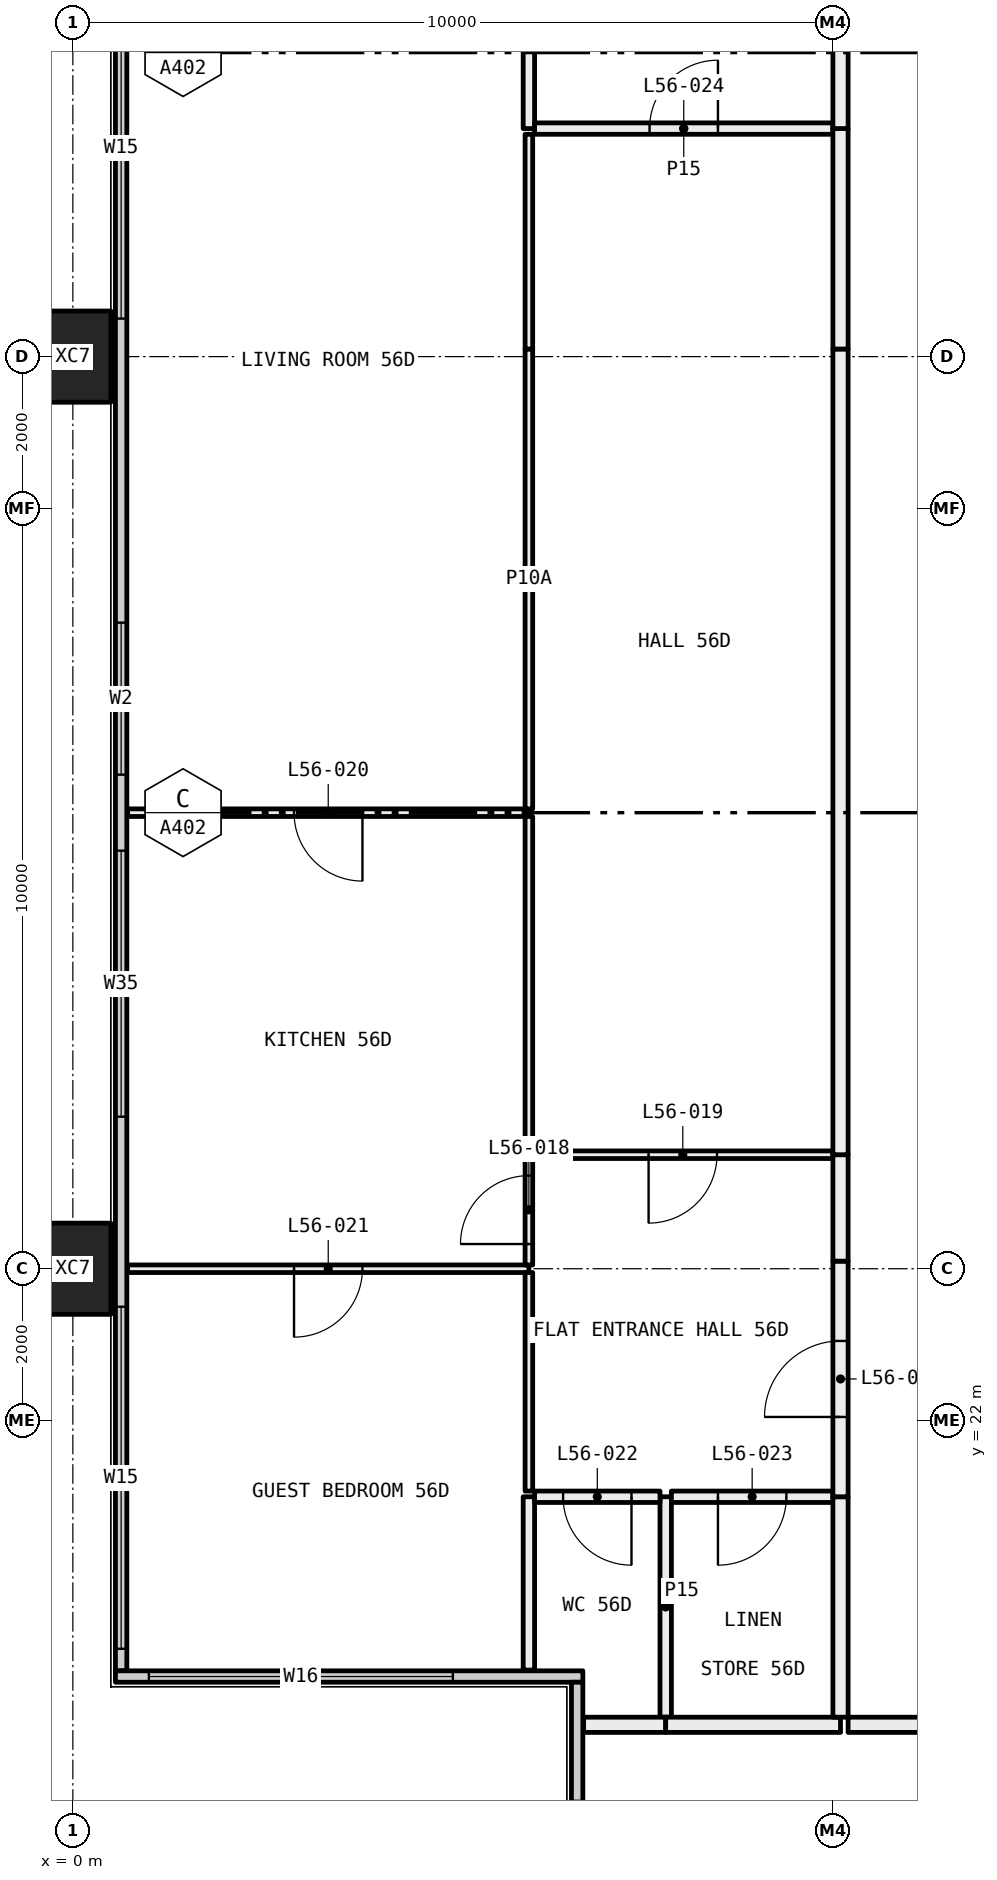
"""IFC4 building model, lengths in metres.
Left out: names, types, materials, properties, quantities, classifications, styles, units other than length and angle.
Written with IfcOpenShell. Run it as: python <this file> out.ifc"""

import sys

from ifc_helpers import new_model, si_unit, direction, frame, frame_2d, origin, origin_2d, place, context, subcontext, project, spatial, rectangle, hollow_rectangle, extrude, element, fill, save


model = new_model("IFC4")
c1 = context("Model", 3, precision=1e-05, world=origin(), true_north=direction((0.0, 1.0)))
c2 = subcontext(c1, "Body", "Model", "MODEL_VIEW")
j1 = project(units=[si_unit("LENGTHUNIT", "METRE"), si_unit("PLANEANGLEUNIT", "RADIAN")], contexts=[c1])
p1 = place(None, origin())
s1 = spatial("IfcSite", under=j1, at=p1, CompositionType="ELEMENT")
p2 = place(p1, origin())
s2 = spatial("IfcBuilding", under=s1, at=p2, CompositionType="ELEMENT")
p3 = place(p2, frame((0.0, 0.0, 210.0)))
s3 = spatial("IfcBuildingStorey", under=s2, at=p3, CompositionType="ELEMENT", Elevation=210.0)
for number, where, z_axis, x_axis in (
    (1, (0.0, 24.0, -0.4), (0.0, 0.0, 1.0), (0.0, 1.0, 0.0)),
    (2, (0.0, 36.0, -0.4), (0.0, 0.0, 1.0), (0.0, 1.0, 0.0)),
):
    element("IfcColumn", number, at=place(p3, frame(where, z_axis=z_axis, x_axis=x_axis)), inside=s3, PredefinedType="COLUMN", context=c2, shape_type="SweptSolid", body=[
        extrude(hollow_rectangle(XDim=1.2, YDim=1.0, WallThickness=0.045, at=origin_2d()), origin(), (0.0, 0.0, 1.0), 3.45),
    ])
p4 = place(p3, frame((0.635, 18.71, 0.0), z_axis=(0.0, 0.0, 1.0), x_axis=(0.0, 1.0, 0.0)))
e3 = element("IfcWall", 3, at=p4, inside=s3, PredefinedType="ELEMENTEDWALL", context=c2, shape_type="SweptSolid", body=[
    extrude(rectangle(XDim=22.58, YDim=0.15, at=frame_2d((11.29, 0.0))), origin(), (0.0, 0.0, 1.0), 3.05),
])
p5 = place(p4, frame((0.29, 0.0, 0.45)))
e4 = element("IfcOpeningElement", 4, at=p5, cuts=e3, PredefinedType="OPENING", context=c2, shape_type="SweptSolid", body=[
    extrude(rectangle(XDim=4.5, YDim=2.55, at=frame_2d((2.25, 1.275))), frame((0.0, 0.085, 0.0), z_axis=(0.0, -1.0, 0.0), x_axis=(1.0, 0.0, 0.0)), (0.0, 0.0, 1.0), 0.17),
])
p6 = place(p4, frame((7.29, 0.0, 0.45)))
e5 = element("IfcOpeningElement", 5, at=p6, cuts=e3, PredefinedType="OPENING", context=c2, shape_type="SweptSolid", body=[
    extrude(rectangle(XDim=3.5, YDim=2.55, at=frame_2d((1.75, 1.275))), frame((0.0, 0.085, 0.0), z_axis=(0.0, -1.0, 0.0), x_axis=(1.0, 0.0, 0.0)), (0.0, 0.0, 1.0), 0.17),
])
p7 = place(p4, frame((11.79, 0.0, 0.45)))
e6 = element("IfcOpeningElement", 6, at=p7, cuts=e3, PredefinedType="OPENING", context=c2, shape_type="SweptSolid", body=[
    extrude(rectangle(XDim=2.0, YDim=2.55, at=frame_2d((1.0, 1.275))), frame((0.0, 0.085, 0.0), z_axis=(0.0, -1.0, 0.0), x_axis=(1.0, 0.0, 0.0)), (0.0, 0.0, 1.0), 0.17),
])
p8 = place(p4, frame((17.79, 0.0, 0.45)))
e7 = element("IfcOpeningElement", 7, at=p8, cuts=e3, PredefinedType="OPENING", context=c2, shape_type="SweptSolid", body=[
    extrude(rectangle(XDim=4.5, YDim=2.55, at=frame_2d((2.25, 1.275))), frame((0.0, 0.085, 0.0), z_axis=(0.0, -1.0, 0.0), x_axis=(1.0, 0.0, 0.0)), (0.0, 0.0, 1.0), 0.17),
])
p9 = place(p3, frame((0.56, 18.635, 0.0), z_axis=(0.0, 0.0, 1.0), x_axis=(1.0, 0.0, 0.0)))
e8 = element("IfcWall", 8, at=p9, inside=s3, PredefinedType="ELEMENTEDWALL", context=c2, shape_type="SweptSolid", body=[
    extrude(rectangle(XDim=6.15, YDim=0.15, at=frame_2d((3.075, 0.0))), origin(), (0.0, 0.0, 1.0), 3.05),
])
p10 = place(p9, frame((0.44, 0.0, 0.45)))
e9 = element("IfcOpeningElement", 9, at=p10, cuts=e8, PredefinedType="OPENING", context=c2, shape_type="SweptSolid", body=[
    extrude(rectangle(XDim=4.0, YDim=2.55, at=frame_2d((2.0, 1.275))), frame((0.0, 0.085, 0.0), z_axis=(0.0, -1.0, 0.0), x_axis=(1.0, 0.0, 0.0)), (0.0, 0.0, 1.0), 0.17),
])
p11 = place(p3, frame((6.635, 12.71, 0.0), z_axis=(0.0, 0.0, 1.0), x_axis=(0.0, 1.0, 0.0)))
e10 = element("IfcWall", 10, at=p11, inside=s3, PredefinedType="ELEMENTEDWALL", context=c2, shape_type="SweptSolid", body=[
    extrude(rectangle(XDim=5.85, YDim=0.15, at=frame_2d((2.925, 0.0))), origin(), (0.0, 0.0, 1.0), 3.05),
])
p12 = place(p11, frame((0.29, 0.0, 0.45)))
e11 = element("IfcOpeningElement", 11, at=p12, cuts=e10, PredefinedType="OPENING", context=c2, shape_type="SweptSolid", body=[
    extrude(rectangle(XDim=4.0, YDim=2.55, at=frame_2d((2.0, 1.275))), frame((0.0, 0.085, 0.0), z_axis=(0.0, -1.0, 0.0), x_axis=(1.0, 0.0, 0.0)), (0.0, 0.0, 1.0), 0.17),
])
p13 = place(p3, frame((6.0, 24.0, 0.0), z_axis=(0.0, 0.0, 1.0), x_axis=(-1.0, 0.0, 0.0)))
e12 = element("IfcWall", 12, at=p13, inside=s3, PredefinedType="PARTITIONING", context=c2, shape_type="SweptSolid", body=[
    extrude(rectangle(XDim=5.28, YDim=0.1, at=frame_2d((2.64, 0.0))), origin(), (0.0, 0.0, 1.0), 2.45),
])
p14 = place(p13, frame((2.19, 0.0, 0.0)))
e13 = element("IfcOpeningElement", 13, at=p14, cuts=e12, PredefinedType="OPENING", context=c2, shape_type="SweptSolid", body=[
    extrude(rectangle(XDim=0.9, YDim=2.1, at=frame_2d((0.45, 1.05))), frame((0.0, 0.06, 0.0), z_axis=(0.0, -1.0, 0.0), x_axis=(1.0, 0.0, 0.0)), (0.0, 0.0, 1.0), 0.12),
])
p15 = place(p3, frame((6.0, 18.72, 0.0), z_axis=(0.0, 0.0, 1.0), x_axis=(0.0, 1.0, 0.0)))
e14 = element("IfcWall", 14, at=p15, inside=s3, PredefinedType="PARTITIONING", context=c2, shape_type="SweptSolid", body=[
    extrude(rectangle(XDim=2.28, YDim=0.15, at=frame_2d((1.14, 0.0))), origin(), (0.0, 0.0, 1.0), 3.05),
])
p16 = place(p3, frame((6.0, 21.075, 0.0), z_axis=(0.0, 0.0, 1.0), x_axis=(0.0, 1.0, 0.0)))
e15 = element("IfcWall", 15, at=p16, inside=s3, PredefinedType="PARTITIONING", context=c2, shape_type="SweptSolid", body=[
    extrude(rectangle(XDim=2.875, YDim=0.1, at=frame_2d((1.438, 0.0))), origin(), (0.0, 0.0, 1.0), 2.45),
])
p17 = place(p3, frame((6.0, 30.0, 0.0), z_axis=(0.0, 0.0, 1.0), x_axis=(-1.0, 0.0, 0.0)))
e16 = element("IfcWall", 16, at=p17, inside=s3, PredefinedType="PARTITIONING", context=c2, shape_type="SweptSolid", body=[
    extrude(rectangle(XDim=5.28, YDim=0.1, at=frame_2d((2.64, 0.0))), origin(), (0.0, 0.0, 1.0), 3.05),
])
p18 = place(p17, frame((2.19, 0.0, 0.0)))
e17 = element("IfcOpeningElement", 17, at=p18, cuts=e16, PredefinedType="OPENING", context=c2, shape_type="SweptSolid", body=[
    extrude(rectangle(XDim=0.9, YDim=2.1, at=frame_2d((0.45, 1.05))), frame((0.0, 0.06, 0.0), z_axis=(0.0, -1.0, 0.0), x_axis=(1.0, 0.0, 0.0)), (0.0, 0.0, 1.0), 0.12),
])
p19 = place(p3, frame((6.0, 24.05, 0.0), z_axis=(0.0, 0.0, 1.0), x_axis=(0.0, 1.0, 0.0)))
e18 = element("IfcWall", 18, at=p19, inside=s3, PredefinedType="PARTITIONING", context=c2, shape_type="SweptSolid", body=[
    extrude(rectangle(XDim=1.45, YDim=0.1, at=frame_2d((0.725, 0.0))), origin(), (0.0, 0.0, 1.0), 2.45),
])
p20 = place(p19, frame((0.275, 0.0, 0.0)))
e19 = element("IfcOpeningElement", 19, at=p20, cuts=e18, PredefinedType="OPENING", context=c2, shape_type="SweptSolid", body=[
    extrude(rectangle(XDim=0.9, YDim=2.1, at=frame_2d((0.45, 1.05))), frame((0.0, 0.06, 0.0), z_axis=(0.0, -1.0, 0.0), x_axis=(1.0, 0.0, 0.0)), (0.0, 0.0, 1.0), 0.12),
])
p21 = place(p3, frame((6.0, 25.5, 0.0), z_axis=(0.0, 0.0, 1.0), x_axis=(0.0, 1.0, 0.0)))
e20 = element("IfcWall", 20, at=p21, inside=s3, PredefinedType="PARTITIONING", context=c2, shape_type="SweptSolid", body=[
    extrude(rectangle(XDim=4.45, YDim=0.1, at=frame_2d((2.225, 0.0))), origin(), (0.0, 0.0, 1.0), 3.05),
])
p22 = place(p3, frame((6.0, 30.05, 0.0), z_axis=(0.0, 0.0, 1.0), x_axis=(0.0, 1.0, 0.0)))
e21 = element("IfcWall", 21, at=p22, inside=s3, PredefinedType="PARTITIONING", context=c2, shape_type="SweptSolid", body=[
    extrude(rectangle(XDim=6.05, YDim=0.1, at=frame_2d((3.025, 0.0))), origin(), (0.0, 0.0, 1.0), 2.45),
])
p23 = place(p3, frame((6.0, 36.1, 0.0), z_axis=(0.0, 0.0, 1.0), x_axis=(0.0, 1.0, 0.0)))
e22 = element("IfcWall", 22, at=p23, inside=s3, PredefinedType="PARTITIONING", context=c2, shape_type="SweptSolid", body=[
    extrude(rectangle(XDim=2.825, YDim=0.1, at=frame_2d((1.413, 0.0))), origin(), (0.0, 0.0, 1.0), 3.05),
])
p24 = place(p3, frame((6.0, 39.0, 0.0), z_axis=(0.0, 0.0, 1.0), x_axis=(0.0, 1.0, 0.0)))
e23 = element("IfcWall", 23, at=p24, inside=s3, PredefinedType="PARTITIONING", context=c2, shape_type="SweptSolid", body=[
    extrude(rectangle(XDim=2.28, YDim=0.15, at=frame_2d((1.14, 0.0))), origin(), (0.0, 0.0, 1.0), 3.05),
])
p25 = place(p3, frame((7.8, 18.1, 0.0), z_axis=(0.0, 0.0, 1.0), x_axis=(0.0, 1.0, 0.0)))
e24 = element("IfcWall", 24, at=p25, inside=s3, PredefinedType="PARTITIONING", context=c2, shape_type="SweptSolid", body=[
    extrude(rectangle(XDim=2.9, YDim=0.15, at=frame_2d((1.45, 0.0))), origin(), (0.0, 0.0, 1.0), 3.05),
])
p26 = place(p3, frame((7.725, 21.0, 0.0), z_axis=(0.0, 0.0, 1.0), x_axis=(-1.0, 0.0, 0.0)))
e25 = element("IfcWall", 25, at=p26, inside=s3, PredefinedType="PARTITIONING", context=c2, shape_type="SweptSolid", body=[
    extrude(rectangle(XDim=1.65, YDim=0.15, at=frame_2d((0.825, 0.0))), origin(), (0.0, 0.0, 1.0), 3.05),
])
p27 = place(p26, frame((0.375, 0.0, 0.0)))
e26 = element("IfcOpeningElement", 26, at=p27, cuts=e25, PredefinedType="OPENING", context=c2, shape_type="SweptSolid", body=[
    extrude(rectangle(XDim=0.9, YDim=2.1, at=frame_2d((0.45, 1.05))), frame((0.0, 0.085, 0.0), z_axis=(0.0, -1.0, 0.0), x_axis=(1.0, 0.0, 0.0)), (0.0, 0.0, 1.0), 0.17),
])
p28 = place(p3, frame((6.72, 18.0, 0.0), z_axis=(0.0, 0.0, 1.0), x_axis=(1.0, 0.0, 0.0)))
e27 = element("IfcWall", 27, at=p28, inside=s3, PredefinedType="PARTITIONING", context=c2, shape_type="SweptSolid", body=[
    extrude(rectangle(XDim=1.08, YDim=0.2, at=frame_2d((0.54, 0.0))), origin(), (0.0, 0.0, 1.0), 3.05),
])
p29 = place(p3, frame((10.0, 21.0, 0.0), z_axis=(0.0, 0.0, 1.0), x_axis=(-1.0, 0.0, 0.0)))
e28 = element("IfcWall", 28, at=p29, inside=s3, PredefinedType="PARTITIONING", context=c2, shape_type="SweptSolid", body=[
    extrude(rectangle(XDim=2.125, YDim=0.15, at=frame_2d((1.062, 0.0))), origin(), (0.0, 0.0, 1.0), 3.05),
])
p30 = place(p29, frame((0.613, 0.0, 0.0)))
e29 = element("IfcOpeningElement", 29, at=p30, cuts=e28, PredefinedType="OPENING", context=c2, shape_type="SweptSolid", body=[
    extrude(rectangle(XDim=0.9, YDim=2.1, at=frame_2d((0.45, 1.05))), frame((0.0, 0.085, 0.0), z_axis=(0.0, -1.0, 0.0), x_axis=(1.0, 0.0, 0.0)), (0.0, 0.0, 1.0), 0.17),
])
p31 = place(p3, frame((7.8, 18.0, 0.0), z_axis=(0.0, 0.0, 1.0), x_axis=(1.0, 0.0, 0.0)))
e30 = element("IfcWall", 30, at=p31, inside=s3, PredefinedType="PARTITIONING", context=c2, shape_type="SweptSolid", body=[
    extrude(rectangle(XDim=2.3, YDim=0.2, at=frame_2d((1.15, 0.0))), origin(), (0.0, 0.0, 1.0), 3.05),
])
p32 = place(p3, frame((10.1, 18.1, 0.0), z_axis=(0.0, 0.0, 1.0), x_axis=(0.0, 1.0, 0.0)))
e31 = element("IfcWall", 31, at=p32, inside=s3, PredefinedType="PARTITIONING", context=c2, shape_type="SweptSolid", body=[
    extrude(rectangle(XDim=2.9, YDim=0.2, at=frame_2d((1.45, 0.0))), origin(), (0.0, 0.0, 1.0), 3.05),
])
p33 = place(p3, frame((10.0, 25.5, 0.0), z_axis=(0.0, 0.0, 1.0), x_axis=(-1.0, 0.0, 0.0)))
e32 = element("IfcWall", 32, at=p33, inside=s3, PredefinedType="PARTITIONING", context=c2, shape_type="SweptSolid", body=[
    extrude(rectangle(XDim=3.95, YDim=0.1, at=frame_2d((1.975, 0.0))), origin(), (0.0, 0.0, 1.0), 3.05),
])
p34 = place(p33, frame((1.525, 0.0, 0.0)))
e33 = element("IfcOpeningElement", 33, at=p34, cuts=e32, PredefinedType="OPENING", context=c2, shape_type="SweptSolid", body=[
    extrude(rectangle(XDim=0.9, YDim=2.1, at=frame_2d((0.45, 1.05))), frame((0.0, 0.06, 0.0), z_axis=(0.0, -1.0, 0.0), x_axis=(1.0, 0.0, 0.0)), (0.0, 0.0, 1.0), 0.12),
])
p35 = place(p3, frame((10.1, 21.0, 0.0), z_axis=(0.0, 0.0, 1.0), x_axis=(0.0, 1.0, 0.0)))
e34 = element("IfcWall", 34, at=p35, inside=s3, PredefinedType="PARTITIONING", context=c2, shape_type="SweptSolid", body=[
    extrude(rectangle(XDim=3.1, YDim=0.2, at=frame_2d((1.55, 0.0))), origin(), (0.0, 0.0, 1.0), 2.45),
])
p36 = place(p35, frame((1.05, 0.0, 0.0)))
e35 = element("IfcOpeningElement", 35, at=p36, cuts=e34, PredefinedType="OPENING", context=c2, shape_type="SweptSolid", body=[
    extrude(rectangle(XDim=1.0, YDim=2.1, at=frame_2d((0.5, 1.05))), frame((0.0, 0.11, 0.0), z_axis=(0.0, -1.0, 0.0), x_axis=(1.0, 0.0, 0.0)), (0.0, 0.0, 1.0), 0.22),
])
p37 = place(p3, frame((10.1, 24.1, 0.0), z_axis=(0.0, 0.0, 1.0), x_axis=(0.0, 1.0, 0.0)))
e36 = element("IfcWall", 36, at=p37, inside=s3, PredefinedType="PARTITIONING", context=c2, shape_type="SweptSolid", body=[
    extrude(rectangle(XDim=1.4, YDim=0.2, at=frame_2d((0.7, 0.0))), origin(), (0.0, 0.0, 1.0), 3.05),
])
p38 = place(p3, frame((10.0, 39.0, 0.0), z_axis=(0.0, 0.0, 1.0), x_axis=(-1.0, 0.0, 0.0)))
e37 = element("IfcWall", 37, at=p38, inside=s3, PredefinedType="PARTITIONING", context=c2, shape_type="SweptSolid", body=[
    extrude(rectangle(XDim=3.925, YDim=0.15, at=frame_2d((1.962, 0.0))), origin(), (0.0, 0.0, 1.0), 3.05),
])
p39 = place(p38, frame((1.512, 0.0, 0.0)))
e38 = element("IfcOpeningElement", 38, at=p39, cuts=e37, PredefinedType="OPENING", context=c2, shape_type="SweptSolid", body=[
    extrude(rectangle(XDim=0.9, YDim=2.1, at=frame_2d((0.45, 1.05))), frame((0.0, 0.085, 0.0), z_axis=(0.0, -1.0, 0.0), x_axis=(1.0, 0.0, 0.0)), (0.0, 0.0, 1.0), 0.17),
])
p40 = place(p3, frame((10.1, 25.5, 0.0), z_axis=(0.0, 0.0, 1.0), x_axis=(0.0, 1.0, 0.0)))
e39 = element("IfcWall", 39, at=p40, inside=s3, PredefinedType="PARTITIONING", context=c2, shape_type="SweptSolid", body=[
    extrude(rectangle(XDim=10.6, YDim=0.2, at=frame_2d((5.3, 0.0))), origin(), (0.0, 0.0, 1.0), 2.45),
])
for number, where, z_axis, x_axis in (
    (40, (10.1, 36.1, 0.0), (0.0, 0.0, 1.0), (0.0, 1.0, 0.0)),
    (41, (10.1, 39.0, 0.0), (0.0, 0.0, 1.0), (0.0, 1.0, 0.0)),
):
    element("IfcWall", number, at=place(p3, frame(where, z_axis=z_axis, x_axis=x_axis)), inside=s3, PredefinedType="PARTITIONING", context=c2, shape_type="SweptSolid", body=[
        extrude(rectangle(XDim=2.9, YDim=0.2, at=frame_2d((1.45, 0.0))), origin(), (0.0, 0.0, 1.0), 3.05),
    ])
p41 = place(p3, frame((23.9, 18.0, 0.0), z_axis=(0.0, 0.0, 1.0), x_axis=(-1.0, 0.0, 0.0)))
e42 = element("IfcWall", 42, at=p41, inside=s3, PredefinedType="PARTITIONING", context=c2, shape_type="SweptSolid", body=[
    extrude(rectangle(XDim=13.7, YDim=0.2, at=frame_2d((6.85, 0.0))), origin(), (0.0, 0.0, 1.0), 3.05),
])
p42 = place(p41, frame((6.05, 0.0, 0.0)))
e43 = element("IfcOpeningElement", 43, at=p42, cuts=e42, PredefinedType="OPENING", context=c2, shape_type="SweptSolid", body=[
    extrude(rectangle(XDim=1.6, YDim=2.1, at=frame_2d((0.8, 1.05))), frame((0.0, 0.11, 0.0), z_axis=(0.0, -1.0, 0.0), x_axis=(1.0, 0.0, 0.0)), (0.0, 0.0, 1.0), 0.22),
])
p43 = place(p5, origin())
e44 = element("IfcWindow", 44, at=p43, inside=s3, PartitioningType="SINGLE_PANEL", PredefinedType="WINDOW", context=c2, shape_type="SweptSolid", body=[
    extrude(rectangle(XDim=4.5, YDim=2.55, at=frame_2d((2.25, 1.275))), frame((0.0, 0.03, 0.0), z_axis=(0.0, -1.0, 0.0), x_axis=(1.0, 0.0, 0.0)), (0.0, 0.0, 1.0), 0.06),
])
fill(e4, e44)
p44 = place(p6, origin())
e45 = element("IfcWindow", 45, at=p44, inside=s3, PartitioningType="SINGLE_PANEL", PredefinedType="WINDOW", context=c2, shape_type="SweptSolid", body=[
    extrude(rectangle(XDim=3.5, YDim=2.55, at=frame_2d((1.75, 1.275))), frame((0.0, 0.03, 0.0), z_axis=(0.0, -1.0, 0.0), x_axis=(1.0, 0.0, 0.0)), (0.0, 0.0, 1.0), 0.06),
])
fill(e5, e45)
p45 = place(p7, origin())
e46 = element("IfcWindow", 46, at=p45, inside=s3, PartitioningType="SINGLE_PANEL", PredefinedType="WINDOW", context=c2, shape_type="SweptSolid", body=[
    extrude(rectangle(XDim=2.0, YDim=2.55, at=frame_2d((1.0, 1.275))), frame((0.0, 0.03, 0.0), z_axis=(0.0, -1.0, 0.0), x_axis=(1.0, 0.0, 0.0)), (0.0, 0.0, 1.0), 0.06),
])
fill(e6, e46)
p46 = place(p8, origin())
e47 = element("IfcWindow", 47, at=p46, inside=s3, PartitioningType="SINGLE_PANEL", PredefinedType="WINDOW", context=c2, shape_type="SweptSolid", body=[
    extrude(rectangle(XDim=4.5, YDim=2.55, at=frame_2d((2.25, 1.275))), frame((0.0, 0.03, 0.0), z_axis=(0.0, -1.0, 0.0), x_axis=(1.0, 0.0, 0.0)), (0.0, 0.0, 1.0), 0.06),
])
fill(e7, e47)
p47 = place(p10, origin())
e48 = element("IfcWindow", 48, at=p47, inside=s3, PartitioningType="SINGLE_PANEL", PredefinedType="WINDOW", context=c2, shape_type="SweptSolid", body=[
    extrude(rectangle(XDim=4.0, YDim=2.55, at=frame_2d((2.0, 1.275))), frame((0.0, 0.03, 0.0), z_axis=(0.0, -1.0, 0.0), x_axis=(1.0, 0.0, 0.0)), (0.0, 0.0, 1.0), 0.06),
])
fill(e9, e48)
p48 = place(p36, origin())
e49 = element("IfcDoor", 49, at=p48, inside=s3, OperationType="SINGLE_SWING_RIGHT", PredefinedType="DOOR", context=c2, shape_type="SweptSolid", body=[
    extrude(rectangle(XDim=1.0, YDim=2.1, at=frame_2d((0.5, 1.05))), frame((0.0, 0.025, 0.0), z_axis=(0.0, -1.0, 0.0), x_axis=(1.0, 0.0, 0.0)), (0.0, 0.0, 1.0), 0.05),
])
fill(e35, e49)
p49 = place(p20, origin())
e50 = element("IfcDoor", 50, at=p49, inside=s3, OperationType="SINGLE_SWING_RIGHT", PredefinedType="DOOR", context=c2, shape_type="SweptSolid", body=[
    extrude(rectangle(XDim=0.9, YDim=2.1, at=frame_2d((0.45, 1.05))), frame((0.0, 0.025, 0.0), z_axis=(0.0, -1.0, 0.0), x_axis=(1.0, 0.0, 0.0)), (0.0, 0.0, 1.0), 0.05),
])
fill(e19, e50)
p50 = place(p34, origin())
e51 = element("IfcDoor", 51, at=p50, inside=s3, OperationType="SINGLE_SWING_LEFT", PredefinedType="DOOR", context=c2, shape_type="SweptSolid", body=[
    extrude(rectangle(XDim=0.9, YDim=2.1, at=frame_2d((0.45, 1.05))), frame((0.0, 0.025, 0.0), z_axis=(0.0, -1.0, 0.0), x_axis=(1.0, 0.0, 0.0)), (0.0, 0.0, 1.0), 0.05),
])
fill(e33, e51)
p51 = place(p18, origin())
e52 = element("IfcDoor", 52, at=p51, inside=s3, OperationType="SINGLE_SWING_RIGHT", PredefinedType="DOOR", context=c2, shape_type="SweptSolid", body=[
    extrude(rectangle(XDim=0.9, YDim=2.1, at=frame_2d((0.45, 1.05))), frame((0.0, 0.025, 0.0), z_axis=(0.0, -1.0, 0.0), x_axis=(1.0, 0.0, 0.0)), (0.0, 0.0, 1.0), 0.05),
])
fill(e17, e52)
p52 = place(p14, origin())
e53 = element("IfcDoor", 53, at=p52, inside=s3, OperationType="SINGLE_SWING_LEFT", PredefinedType="DOOR", context=c2, shape_type="SweptSolid", body=[
    extrude(rectangle(XDim=0.9, YDim=2.1, at=frame_2d((0.45, 1.05))), frame((0.0, 0.025, 0.0), z_axis=(0.0, -1.0, 0.0), x_axis=(1.0, 0.0, 0.0)), (0.0, 0.0, 1.0), 0.05),
])
fill(e13, e53)
p53 = place(p27, origin())
e54 = element("IfcDoor", 54, at=p53, inside=s3, OperationType="SINGLE_SWING_RIGHT", PredefinedType="DOOR", context=c2, shape_type="SweptSolid", body=[
    extrude(rectangle(XDim=0.9, YDim=2.1, at=frame_2d((0.45, 1.05))), frame((0.0, 0.025, 0.0), z_axis=(0.0, -1.0, 0.0), x_axis=(1.0, 0.0, 0.0)), (0.0, 0.0, 1.0), 0.05),
])
fill(e26, e54)
p54 = place(p30, origin())
e55 = element("IfcDoor", 55, at=p54, inside=s3, OperationType="SINGLE_SWING_LEFT", PredefinedType="DOOR", context=c2, shape_type="SweptSolid", body=[
    extrude(rectangle(XDim=0.9, YDim=2.1, at=frame_2d((0.45, 1.05))), frame((0.0, 0.025, 0.0), z_axis=(0.0, -1.0, 0.0), x_axis=(1.0, 0.0, 0.0)), (0.0, 0.0, 1.0), 0.05),
])
fill(e29, e55)
p55 = place(p39, frame((0.9, 0.0, 0.0), x_axis=(-1.0, 0.0, 0.0)))
e56 = element("IfcDoor", 56, at=p55, inside=s3, OperationType="SINGLE_SWING_LEFT", PredefinedType="DOOR", context=c2, shape_type="SweptSolid", body=[
    extrude(rectangle(XDim=0.9, YDim=2.1, at=frame_2d((0.45, 1.05))), frame((0.0, 0.025, 0.0), z_axis=(0.0, -1.0, 0.0), x_axis=(1.0, 0.0, 0.0)), (0.0, 0.0, 1.0), 0.05),
])
fill(e38, e56)
save(model, sys.argv[1])
